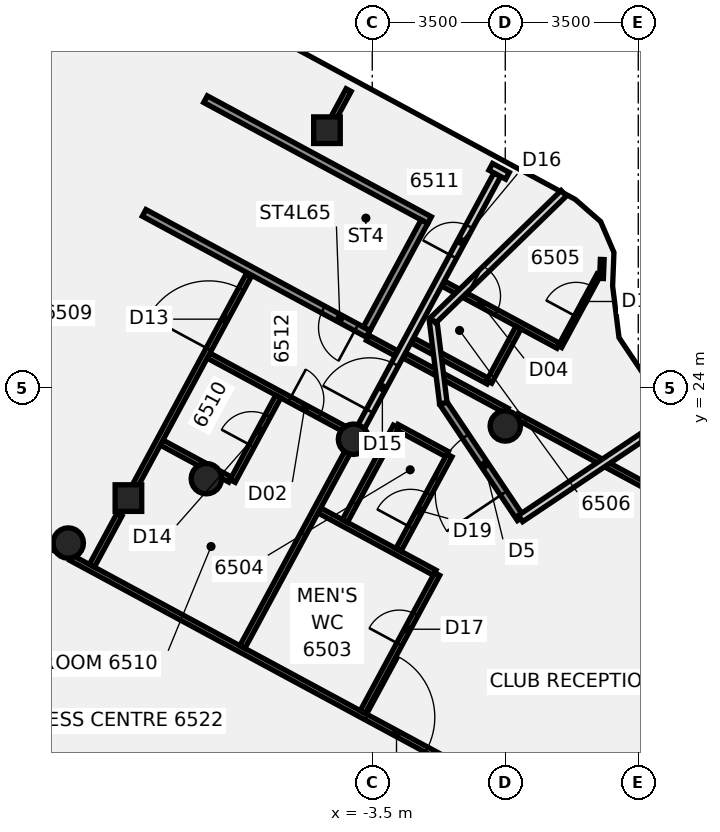
"""IFC4 building model, lengths in metres.
Left out: names, types, materials, properties, quantities, classifications, styles, units other than length and angle.
Written with IfcOpenShell. Run it as: python <this file> out.ifc"""

import sys

from ifc_helpers import new_model, si_unit, direction, frame, frame_2d, origin, origin_2d, place, context, subcontext, project, spatial, polyline, rectangle, circle, outline, extrude, element, fill, save


model = new_model("IFC4")
c1 = context("Model", 3, precision=1e-05, world=origin(), true_north=direction((0.0, 1.0)))
c2 = subcontext(c1, "Body", "Model", "MODEL_VIEW")
j1 = project(units=[si_unit("LENGTHUNIT", "METRE"), si_unit("PLANEANGLEUNIT", "RADIAN")], contexts=[c1])
p1 = place(None, origin())
s1 = spatial("IfcSite", under=j1, at=p1, CompositionType="ELEMENT")
p2 = place(p1, origin())
s2 = spatial("IfcBuilding", under=s1, at=p2, CompositionType="ELEMENT")
p3 = place(p2, frame((0.0, 0.0, 256.8)))
s3 = spatial("IfcBuildingStorey", under=s2, at=p3, CompositionType="ELEMENT", Elevation=256.8)
for number, where, z_axis, x_axis in (
    (1, (0.0, 23.0, -0.14), (0.0, 0.0, 1.0), (1.0, 0.0, 0.0)),
    (2, (-3.994, 22.651, -0.14), (0.0, 0.0, 1.0), (1.0, 0.0, 0.0)),
    (3, (-7.866, 21.613, -0.14), (0.0, 0.0, 1.0), (1.0, 0.0, 0.0)),
    (4, (-11.5, 19.919, -0.14), (0.0, 0.0, 1.0), (1.0, 0.0, 0.0)),
):
    element("IfcColumn", number, at=place(p3, frame(where, z_axis=z_axis, x_axis=x_axis)), inside=s3, PredefinedType="COLUMN", context=c2, shape_type="SweptSolid", body=[
        extrude(circle(Radius=0.4, at=origin_2d()), origin(), (0.0, 0.0, 1.0), 3.6),
    ])
for number, where, z_axis, x_axis in (
    (5, (-9.916, 21.102, -0.136), (0.005, -0.05, 0.999), (0.476, 0.879, 0.042)),
    (6, (-4.692, 30.782, -0.136), (-0.044, -0.024, 0.999), (0.879, -0.475, 0.027)),
):
    element("IfcColumn", number, at=place(p3, frame(where, z_axis=z_axis, x_axis=x_axis)), inside=s3, PredefinedType="COLUMN", context=c2, shape_type="SweptSolid", body=[
        extrude(rectangle(XDim=0.7, YDim=0.7, at=origin_2d()), origin(), (0.0, 0.0, 1.0), 3.6),
    ])
p4 = place(p3, frame((-14.852, 21.379, 0.0), z_axis=(0.0, 0.0, 1.0), x_axis=(0.880026474936, -0.47492462919, 0.0)))
e7 = element("IfcWall", 7, at=p4, inside=s3, PredefinedType="PARTITIONING", context=c2, shape_type="SweptSolid", body=[
    extrude(rectangle(XDim=3.388, YDim=0.1, at=frame_2d((1.694, 0.0))), origin(), (0.0, 0.0, 1.0), 2.864),
])
p5 = place(p3, frame((-11.424, 19.529, 0.0), z_axis=(0.0, 0.0, 1.0), x_axis=(0.880009979756, -0.474955193181, 0.0)))
e8 = element("IfcWall", 8, at=p5, inside=s3, PredefinedType="PARTITIONING", context=c2, shape_type="SweptSolid", body=[
    extrude(rectangle(XDim=15.808, YDim=0.15, at=frame_2d((7.904, 0.0))), origin(), (0.0, 0.0, 1.0), 2.864),
])
p6 = place(p5, frame((8.829, 0.0, 0.0)))
e9 = element("IfcOpeningElement", 9, at=p6, cuts=e8, PredefinedType="OPENING", context=c2, shape_type="SweptSolid", body=[
    extrude(rectangle(XDim=1.8, YDim=2.1, at=frame_2d((0.9, 1.05))), frame((0.0, 0.085, 0.0), z_axis=(0.0, -1.0, 0.0), x_axis=(1.0, 0.0, 0.0)), (0.0, 0.0, 1.0), 0.17),
])
p7 = place(p3, frame((-9.043, 22.562, 0.0), z_axis=(0.0, 0.0, 1.0), x_axis=(0.879935954221, -0.475092324153, 0.0)))
e10 = element("IfcWall", 10, at=p7, inside=s3, PredefinedType="PARTITIONING", context=c2, shape_type="SweptSolid", body=[
    extrude(rectangle(XDim=1.202, YDim=0.15, at=frame_2d((0.601, 0.0))), origin(), (0.0, 0.0, 1.0), 2.864),
])
p8 = place(p3, frame((-7.486, 21.722, 0.0), z_axis=(0.0, 0.0, 1.0), x_axis=(0.880051073949, -0.474879044854, 0.0)))
e11 = element("IfcWall", 11, at=p8, inside=s3, PredefinedType="PARTITIONING", context=c2, shape_type="SweptSolid", body=[
    extrude(rectangle(XDim=0.28, YDim=0.15, at=frame_2d((0.14, 0.0))), origin(), (0.0, 0.0, 1.0), 2.864),
])
p9 = place(p3, frame((-7.808, 24.85, 0.0), z_axis=(0.0, 0.0, 1.0), x_axis=(0.879989576418, -0.474992995101, 0.0)))
e12 = element("IfcWall", 12, at=p9, inside=s3, PredefinedType="PARTITIONING", context=c2, shape_type="SweptSolid", body=[
    extrude(rectangle(XDim=4.025, YDim=0.15, at=frame_2d((2.013, 0.0))), origin(), (0.0, 0.0, 1.0), 2.864),
])
p10 = place(p9, frame((2.425, 0.0, 0.0)))
e13 = element("IfcOpeningElement", 13, at=p10, cuts=e12, PredefinedType="OPENING", context=c2, shape_type="SweptSolid", body=[
    extrude(rectangle(XDim=0.9, YDim=2.1, at=frame_2d((0.45, 1.05))), frame((0.0, 0.085, 0.0), z_axis=(0.0, -1.0, 0.0), x_axis=(1.0, 0.0, 0.0)), (0.0, 0.0, 1.0), 0.17),
])
p11 = place(p3, frame((-4.893, 20.777, 0.0), z_axis=(0.0, 0.0, 1.0), x_axis=(0.880007149788, -0.474960436586, 0.0)))
e14 = element("IfcWall", 14, at=p11, inside=s3, PredefinedType="PARTITIONING", context=c2, shape_type="SweptSolid", body=[
    extrude(rectangle(XDim=3.45, YDim=0.15, at=frame_2d((1.725, 0.0))), origin(), (0.0, 0.0, 1.0), 2.864),
])
p12 = place(p3, frame((-3.619, 25.317, 0.0), z_axis=(0.0, 0.0, 1.0), x_axis=(0.879960000932, -0.475047783659, 0.0)))
e15 = element("IfcWall", 15, at=p12, inside=s3, PredefinedType="PARTITIONING", context=c2, shape_type="SweptSolid", body=[
    extrude(rectangle(XDim=0.86, YDim=0.15, at=frame_2d((0.43, 0.0))), origin(), (0.0, 0.0, 1.0), 2.864),
])
p13 = place(p3, frame((-2.86, 22.976, 0.0), z_axis=(0.0, 0.0, 1.0), x_axis=(0.880085616352, -0.474815024921, 0.0)))
e16 = element("IfcWall", 16, at=p13, inside=s3, PredefinedType="PARTITIONING", context=c2, shape_type="SweptSolid", body=[
    extrude(rectangle(XDim=1.506, YDim=0.15, at=frame_2d((0.753, 0.0))), origin(), (0.0, 0.0, 1.0), 2.864),
])
p14 = place(p3, frame((-2.662, 24.857, 0.0), z_axis=(0.0, 0.0, 1.0), x_axis=(0.880044328611, -0.474891545176, 0.0)))
e17 = element("IfcWall", 17, at=p14, inside=s3, PredefinedType="PARTITIONING", context=c2, shape_type="SweptSolid", body=[
    extrude(rectangle(XDim=3.07, YDim=0.15, at=frame_2d((1.535, 0.0))), origin(), (0.0, 0.0, 1.0), 2.864),
])
p15 = place(p3, frame((0.302, 23.258, 0.0), z_axis=(0.0, 0.0, 1.0), x_axis=(0.88000876601, -0.474957442037, 0.0)))
e18 = element("IfcWall", 18, at=p15, inside=s3, PredefinedType="PARTITIONING", context=c2, shape_type="SweptSolid", body=[
    extrude(rectangle(XDim=14.256, YDim=0.15, at=frame_2d((7.128, 0.0))), origin(), (0.0, 0.0, 1.0), 2.864),
])
p16 = place(p15, frame((4.8, 0.0, 0.0)))
e19 = element("IfcOpeningElement", 19, at=p16, cuts=e18, PredefinedType="OPENING", context=c2, shape_type="SweptSolid", body=[
    extrude(rectangle(XDim=0.9, YDim=2.1, at=frame_2d((0.45, 1.05))), frame((0.0, 0.085, 0.0), z_axis=(0.0, -1.0, 0.0), x_axis=(1.0, 0.0, 0.0)), (0.0, 0.0, 1.0), 0.17),
])
p17 = place(p3, frame((-2.445, 25.251, 0.0), z_axis=(0.0, 0.0, 1.0), x_axis=(0.879950258975, -0.475065828839, 0.0)))
e20 = element("IfcWall", 20, at=p17, inside=s3, PredefinedType="PARTITIONING", context=c2, shape_type="SweptSolid", body=[
    extrude(rectangle(XDim=2.275, YDim=0.15, at=frame_2d((1.138, 0.0))), origin(), (0.0, 0.0, 1.0), 2.864),
])
p18 = place(p3, frame((-1.641, 26.75, 0.0), z_axis=(0.0, 0.0, 1.0), x_axis=(0.879977572417, -0.475015233486, 0.0)))
e21 = element("IfcWall", 21, at=p18, inside=s3, PredefinedType="PARTITIONING", context=c2, shape_type="SweptSolid", body=[
    extrude(rectangle(XDim=3.45, YDim=0.15, at=frame_2d((1.725, 0.0))), origin(), (0.0, 0.0, 1.0), 2.864),
])
p19 = place(p18, frame((0.7, 0.0, 0.0)))
e22 = element("IfcOpeningElement", 22, at=p19, cuts=e21, PredefinedType="OPENING", context=c2, shape_type="SweptSolid", body=[
    extrude(rectangle(XDim=0.9, YDim=2.1, at=frame_2d((0.45, 1.05))), frame((0.0, 0.085, 0.0), z_axis=(0.0, -1.0, 0.0), x_axis=(1.0, 0.0, 0.0)), (0.0, 0.0, 1.0), 0.17),
])
p20 = place(p3, frame((-10.876, 19.324, 0.0), z_axis=(0.0, 0.0, 1.0), x_axis=(0.474948327348, 0.880013685319, 0.0)))
e23 = element("IfcWall", 23, at=p20, inside=s3, PredefinedType="PARTITIONING", context=c2, shape_type="SweptSolid", body=[
    extrude(rectangle(XDim=1.527, YDim=0.15, at=frame_2d((0.763, 0.0))), origin(), (0.0, 0.0, 1.0), 2.864),
])
p21 = place(p3, frame((-9.755, 21.401, 0.0), z_axis=(0.0, 0.0, 1.0), x_axis=(0.47500714936, 0.87998193621, 0.0)))
e24 = element("IfcWall", 24, at=p21, inside=s3, PredefinedType="PARTITIONING", context=c2, shape_type="SweptSolid", body=[
    extrude(rectangle(XDim=6.32, YDim=0.15, at=frame_2d((3.16, 0.0))), origin(), (0.0, 0.0, 1.0), 2.864),
])
p22 = place(p21, frame((4.11, 0.0, 0.0)))
e25 = element("IfcOpeningElement", 25, at=p22, cuts=e24, PredefinedType="OPENING", context=c2, shape_type="SweptSolid", body=[
    extrude(rectangle(XDim=1.8, YDim=2.1, at=frame_2d((0.9, 1.05))), frame((0.0, 0.085, 0.0), z_axis=(0.0, -1.0, 0.0), x_axis=(1.0, 0.0, 0.0)), (0.0, 0.0, 1.0), 0.17),
])
p23 = place(p3, frame((-4.529, 31.083, 0.0), z_axis=(0.0, 0.0, 1.0), x_axis=(0.474932601123, 0.88002217267, 0.0)))
e26 = element("IfcWall", 26, at=p23, inside=s3, PredefinedType="PARTITIONING", context=c2, shape_type="SweptSolid", body=[
    extrude(rectangle(XDim=0.856, YDim=0.15, at=frame_2d((0.428, 0.0))), origin(), (0.0, 0.0, 1.0), 2.864),
])
p24 = place(p3, frame((-7.173, 21.553, 0.0), z_axis=(0.0, 0.0, 1.0), x_axis=(0.475033626328, 0.879967643642, 0.0)))
e27 = element("IfcWall", 27, at=p24, inside=s3, PredefinedType="PARTITIONING", context=c2, shape_type="SweptSolid", body=[
    extrude(rectangle(XDim=2.525, YDim=0.15, at=frame_2d((1.262, 0.0))), origin(), (0.0, 0.0, 1.0), 2.864),
])
p25 = place(p24, frame((1.05, 0.0, 0.0)))
e28 = element("IfcOpeningElement", 28, at=p25, cuts=e27, PredefinedType="OPENING", context=c2, shape_type="SweptSolid", body=[
    extrude(rectangle(XDim=0.9, YDim=2.1, at=frame_2d((0.45, 1.05))), frame((0.0, 0.085, 0.0), z_axis=(0.0, -1.0, 0.0), x_axis=(1.0, 0.0, 0.0)), (0.0, 0.0, 1.0), 0.17),
])
p26 = place(p3, frame((-6.918, 17.183, 0.0), z_axis=(0.0, 0.0, 1.0), x_axis=(0.475010414469, 0.879980173723, 0.0)))
e29 = element("IfcWall", 29, at=p26, inside=s3, PredefinedType="PARTITIONING", context=c2, shape_type="SweptSolid", body=[
    extrude(rectangle(XDim=5.978, YDim=0.15, at=frame_2d((2.989, 0.0))), origin(), (0.0, 0.0, 1.0), 2.864),
])
p27 = place(p3, frame((-3.865, 22.84, 0.0), z_axis=(0.0, 0.0, 1.0), x_axis=(0.474975497938, 0.879999020658, 0.0)))
e30 = element("IfcWall", 30, at=p27, inside=s3, PredefinedType="PARTITIONING", context=c2, shape_type="SweptSolid", body=[
    extrude(rectangle(XDim=7.696, YDim=0.2, at=frame_2d((3.848, 0.0))), origin(), (0.0, 0.0, 1.0), 2.864),
])
p28 = place(p27, frame((0.629, 0.0, 0.0)))
e31 = element("IfcOpeningElement", 31, at=p28, cuts=e30, PredefinedType="OPENING", context=c2, shape_type="SweptSolid", body=[
    extrude(rectangle(XDim=1.4, YDim=2.1, at=frame_2d((0.7, 1.05))), frame((0.0, 0.11, 0.0), z_axis=(0.0, -1.0, 0.0), x_axis=(1.0, 0.0, 0.0)), (0.0, 0.0, 1.0), 0.22),
])
p29 = place(p27, frame((5.247, 0.0, 0.0)))
e32 = element("IfcOpeningElement", 32, at=p29, cuts=e30, PredefinedType="OPENING", context=c2, shape_type="SweptSolid", body=[
    extrude(rectangle(XDim=0.9, YDim=2.1, at=frame_2d((0.45, 1.05))), frame((0.0, 0.11, 0.0), z_axis=(0.0, -1.0, 0.0), x_axis=(1.0, 0.0, 0.0)), (0.0, 0.0, 1.0), 0.22),
])
p30 = place(p3, frame((-4.219, 20.499, 0.0), z_axis=(0.0, 0.0, 1.0), x_axis=(0.47489329303, 0.880043385428, 0.0)))
e33 = element("IfcWall", 33, at=p30, inside=s3, PredefinedType="PARTITIONING", context=c2, shape_type="SweptSolid", body=[
    extrude(rectangle(XDim=2.825, YDim=0.15, at=frame_2d((1.413, 0.0))), origin(), (0.0, 0.0, 1.0), 2.864),
])
p31 = place(p3, frame((-3.75, 15.473, 0.0), z_axis=(0.0, 0.0, 1.0), x_axis=(0.474999530937, 0.879986048531, 0.0)))
e34 = element("IfcWall", 34, at=p31, inside=s3, PredefinedType="PARTITIONING", context=c2, shape_type="SweptSolid", body=[
    extrude(rectangle(XDim=4.125, YDim=0.15, at=frame_2d((2.062, 0.0))), origin(), (0.0, 0.0, 1.0), 2.864),
])
p32 = place(p31, frame((2.025, 0.0, 0.0)))
e35 = element("IfcOpeningElement", 35, at=p32, cuts=e34, PredefinedType="OPENING", context=c2, shape_type="SweptSolid", body=[
    extrude(rectangle(XDim=0.9, YDim=2.1, at=frame_2d((0.45, 1.05))), frame((0.0, 0.085, 0.0), z_axis=(0.0, -1.0, 0.0), x_axis=(1.0, 0.0, 0.0)), (0.0, 0.0, 1.0), 0.17),
])
p33 = place(p3, frame((1.439, 25.087, 0.0), z_axis=(0.0, 0.0, 1.0), x_axis=(0.475008069141, 0.87998143972, 0.0)))
e36 = element("IfcWall", 36, at=p33, inside=s3, PredefinedType="PARTITIONING", context=c2, shape_type="SweptSolid", body=[
    extrude(rectangle(XDim=2.147, YDim=0.1, at=frame_2d((1.074, 0.0))), origin(), (0.0, 0.0, 1.0), 2.864),
])
p34 = place(p33, frame((0.9, 0.0, 0.0)))
e37 = element("IfcOpeningElement", 37, at=p34, cuts=e36, PredefinedType="OPENING", context=c2, shape_type="SweptSolid", body=[
    extrude(rectangle(XDim=0.9, YDim=2.1, at=frame_2d((0.45, 1.05))), frame((0.0, 0.06, 0.0), z_axis=(0.0, -1.0, 0.0), x_axis=(1.0, 0.0, 0.0)), (0.0, 0.0, 1.0), 0.12),
])
p35 = place(p3, frame((-2.811, 19.739, 0.0), z_axis=(0.0, 0.0, 1.0), x_axis=(0.475094053196, 0.879935020679, 0.0)))
e38 = element("IfcWall", 38, at=p35, inside=s3, PredefinedType="PARTITIONING", context=c2, shape_type="SweptSolid", body=[
    extrude(rectangle(XDim=2.825, YDim=0.15, at=frame_2d((1.413, 0.0))), origin(), (0.0, 0.0, 1.0), 2.864),
])
p36 = place(p35, frame((0.675, 0.0, 0.0)))
e39 = element("IfcOpeningElement", 39, at=p36, cuts=e38, PredefinedType="OPENING", context=c2, shape_type="SweptSolid", body=[
    extrude(rectangle(XDim=1.0, YDim=2.1, at=frame_2d((0.5, 1.05))), frame((0.0, 0.085, 0.0), z_axis=(0.0, -1.0, 0.0), x_axis=(1.0, 0.0, 0.0)), (0.0, 0.0, 1.0), 0.17),
])
p37 = place(p3, frame((-0.424, 24.16, 0.0), z_axis=(0.0, 0.0, 1.0), x_axis=(0.475111699271, 0.879925492991, 0.0)))
e40 = element("IfcWall", 40, at=p37, inside=s3, PredefinedType="PARTITIONING", context=c2, shape_type="SweptSolid", body=[
    extrude(rectangle(XDim=1.625, YDim=0.15, at=frame_2d((0.812, 0.0))), origin(), (0.0, 0.0, 1.0), 2.864),
])
p38 = place(p3, frame((2.532, 26.881, 0.0), z_axis=(0.0, 0.0, 1.0), x_axis=(0.039539159627, 0.999218021683, 0.0)))
e41 = element("IfcWall", 41, at=p38, inside=s3, PredefinedType="PARTITIONING", context=c2, shape_type="SweptSolid", body=[
    extrude(rectangle(XDim=0.5, YDim=0.1, at=frame_2d((0.25, 0.0))), origin(), (0.0, 0.0, 1.0), 2.864),
])
p39 = place(p3, frame((0.058, 29.581, 0.0), z_axis=(0.0, 0.0, 1.0), x_axis=(-0.880125838865, 0.474740463583, 0.0)))
e42 = element("IfcWall", 42, at=p39, inside=s3, PredefinedType="PARTITIONING", context=c2, shape_type="SweptSolid", body=[
    extrude(rectangle(XDim=0.5, YDim=0.2, at=frame_2d((0.25, 0.0))), origin(), (0.0, 0.0, 1.0), 2.864),
])
p40 = place(p3, frame((0.403, 20.565, 0.0), z_axis=(0.0, 0.0, 1.0), x_axis=(-0.55638015725, 0.830927867278, 0.0)))
e43 = element("IfcWall", 43, at=p40, inside=s3, PredefinedType="SOLIDWALL", context=c2, shape_type="SweptSolid", body=[
    extrude(rectangle(XDim=3.653, YDim=0.2, at=frame_2d((1.827, 0.0))), origin(), (0.0, 0.0, 1.0), 2.964),
])
p41 = place(p40, frame((0.8, 0.0, 0.0)))
e44 = element("IfcOpeningElement", 44, at=p41, cuts=e43, PredefinedType="OPENING", context=c2, shape_type="SweptSolid", body=[
    extrude(rectangle(XDim=1.8, YDim=2.4, at=frame_2d((0.9, 1.2))), frame((0.0, 0.11, 0.0), z_axis=(0.0, -1.0, 0.0), x_axis=(1.0, 0.0, 0.0)), (0.0, 0.0, 1.0), 0.22),
])
p42 = place(p3, frame((0.403, 20.565, 0.0), z_axis=(0.0, 0.0, 1.0), x_axis=(0.830933103282, 0.556372337441, 0.0)))
e45 = element("IfcWall", 45, at=p42, inside=s3, PredefinedType="SOLIDWALL", context=c2, shape_type="SweptSolid", body=[
    extrude(rectangle(XDim=5.286, YDim=0.2, at=frame_2d((2.643, 0.0))), origin(), (0.0, 0.0, 1.0), 3.46),
])
p43 = place(p3, frame((-1.63, 23.601, 0.0), z_axis=(0.0, 0.0, 1.0), x_axis=(-0.12306236425, 0.99239893919, 0.0)))
e46 = element("IfcWall", 46, at=p43, inside=s3, PredefinedType="SOLIDWALL", context=c2, shape_type="SweptSolid", body=[
    extrude(rectangle(XDim=2.194, YDim=0.2, at=frame_2d((1.097, 0.0))), origin(), (0.0, 0.0, 1.0), 3.46),
])
p44 = place(p3, frame((-1.9, 25.778, 0.0), z_axis=(0.0, 0.0, 1.0), x_axis=(0.716859267363, 0.697217893342, 0.0)))
e47 = element("IfcWall", 47, at=p44, inside=s3, PredefinedType="SOLIDWALL", context=c2, shape_type="SweptSolid", body=[
    extrude(rectangle(XDim=4.798, YDim=0.2, at=frame_2d((2.399, 0.0))), origin(), (0.0, 0.0, 1.0), 3.46),
])
p45 = place(p3, frame((-3.607, 25.424, -0.14), z_axis=(0.0, 0.0, 1.0), x_axis=(-0.879996788685, 0.474979633147, 0.0)))
e48 = element("IfcWall", 48, at=p45, inside=s3, PredefinedType="SHEAR", context=c2, shape_type="SweptSolid", body=[
    extrude(rectangle(XDim=6.7, YDim=0.2, at=frame_2d((3.35, 0.0))), origin(), (0.0, 0.0, 1.0), 3.154),
])
p46 = place(p45, frame((0.35, 0.0, 0.0)))
e49 = element("IfcOpeningElement", 49, at=p46, cuts=e48, PredefinedType="OPENING", context=c2, shape_type="SweptSolid", body=[
    extrude(rectangle(XDim=1.0, YDim=2.1, at=frame_2d((0.5, 1.05))), frame((0.0, 0.11, 0.0), z_axis=(0.0, -1.0, 0.0), x_axis=(1.0, 0.0, 0.0)), (0.0, 0.0, 1.0), 0.22),
])
p47 = place(p3, frame((-1.992, 28.416, -0.14), z_axis=(0.0, 0.0, 1.0), x_axis=(-0.879996788685, 0.474979633147, 0.0)))
e50 = element("IfcWall", 50, at=p47, inside=s3, PredefinedType="SHEAR", context=c2, shape_type="SweptSolid", body=[
    extrude(rectangle(XDim=6.7, YDim=0.2, at=frame_2d((3.35, 0.0))), origin(), (0.0, 0.0, 1.0), 3.154),
])
p48 = place(p3, frame((-2.127, 28.375, -0.14), z_axis=(0.0, 0.0, 1.0), x_axis=(-0.475009504157, -0.879980665106, 0.0)))
e51 = element("IfcWall", 51, at=p48, inside=s3, PredefinedType="SHEAR", context=c2, shape_type="SweptSolid", body=[
    extrude(rectangle(XDim=3.2, YDim=0.2, at=frame_2d((1.6, 0.0))), origin(), (0.0, 0.0, 1.0), 3.6),
])
p49 = place(p3, frame((0.0, 0.0, -0.14)))
e52 = element("IfcWall", 52, at=p49, inside=s3, PredefinedType="SHEAR", context=c2, shape_type="SweptSolid", body=[
    extrude(outline(polyline([(-7.759, 31.415), (-7.935, 31.51), (-9.455, 28.694), (-9.279, 28.599), (-7.759, 31.415)])), origin(), (0.0, 0.0, 1.0), 3.6),
])
p50 = place(p6, origin())
e53 = element("IfcDoor", 53, at=p50, inside=s3, OperationType="DOUBLE_DOOR_SINGLE_SWING", PredefinedType="DOOR", context=c2, shape_type="SweptSolid", body=[
    extrude(rectangle(XDim=1.8, YDim=2.1, at=frame_2d((0.9, 1.05))), frame((0.0, 0.025, 0.0), z_axis=(0.0, -1.0, 0.0), x_axis=(1.0, 0.0, 0.0)), (0.0, 0.0, 1.0), 0.05),
])
fill(e9, e53)
p51 = place(p10, frame((0.9, 0.0, 0.0), z_axis=(0.0, 0.0, 1.0), x_axis=(-1.0, 0.0, 0.0)))
e54 = element("IfcDoor", 54, at=p51, inside=s3, OperationType="SINGLE_SWING_RIGHT", PredefinedType="DOOR", context=c2, shape_type="SweptSolid", body=[
    extrude(rectangle(XDim=0.9, YDim=2.1, at=frame_2d((0.45, 1.05))), frame((0.0, 0.025, 0.0), z_axis=(0.0, -1.0, 0.0), x_axis=(1.0, 0.0, 0.0)), (0.0, 0.0, 1.0), 0.05),
])
fill(e13, e54)
p52 = place(p19, frame((0.9, 0.0, 0.0), z_axis=(0.0, 0.0, 1.0), x_axis=(-1.0, 0.0, 0.0)))
e55 = element("IfcDoor", 55, at=p52, inside=s3, OperationType="SINGLE_SWING_LEFT", PredefinedType="DOOR", context=c2, shape_type="SweptSolid", body=[
    extrude(rectangle(XDim=0.9, YDim=2.1, at=frame_2d((0.45, 1.05))), frame((0.0, 0.025, 0.0), z_axis=(0.0, -1.0, 0.0), x_axis=(1.0, 0.0, 0.0)), (0.0, 0.0, 1.0), 0.05),
])
fill(e22, e55)
p53 = place(p22, origin())
e56 = element("IfcDoor", 56, at=p53, inside=s3, OperationType="DOUBLE_DOOR_SINGLE_SWING", PredefinedType="DOOR", context=c2, shape_type="SweptSolid", body=[
    extrude(rectangle(XDim=1.8, YDim=2.1, at=frame_2d((0.9, 1.05))), frame((0.0, 0.025, 0.0), z_axis=(0.0, -1.0, 0.0), x_axis=(1.0, 0.0, 0.0)), (0.0, 0.0, 1.0), 0.05),
])
fill(e25, e56)
p54 = place(p25, origin())
e57 = element("IfcDoor", 57, at=p54, inside=s3, OperationType="SINGLE_SWING_LEFT", PredefinedType="DOOR", context=c2, shape_type="SweptSolid", body=[
    extrude(rectangle(XDim=0.9, YDim=2.1, at=frame_2d((0.45, 1.05))), frame((0.0, 0.025, 0.0), z_axis=(0.0, -1.0, 0.0), x_axis=(1.0, 0.0, 0.0)), (0.0, 0.0, 1.0), 0.05),
])
fill(e28, e57)
p55 = place(p28, frame((1.4, 0.0, 0.0), z_axis=(0.0, 0.0, 1.0), x_axis=(-1.0, 0.0, 0.0)))
e58 = element("IfcDoor", 58, at=p55, inside=s3, OperationType="DOUBLE_DOOR_SINGLE_SWING", PredefinedType="DOOR", context=c2, shape_type="SweptSolid", body=[
    extrude(rectangle(XDim=1.4, YDim=2.1, at=frame_2d((0.7, 1.05))), frame((0.0, 0.025, 0.0), z_axis=(0.0, -1.0, 0.0), x_axis=(1.0, 0.0, 0.0)), (0.0, 0.0, 1.0), 0.05),
])
fill(e31, e58)
p56 = place(p29, origin())
e59 = element("IfcDoor", 59, at=p56, inside=s3, OperationType="SINGLE_SWING_LEFT", PredefinedType="DOOR", context=c2, shape_type="SweptSolid", body=[
    extrude(rectangle(XDim=0.9, YDim=2.1, at=frame_2d((0.45, 1.05))), frame((0.0, 0.025, 0.0), z_axis=(0.0, -1.0, 0.0), x_axis=(1.0, 0.0, 0.0)), (0.0, 0.0, 1.0), 0.05),
])
fill(e32, e59)
p57 = place(p32, origin())
e60 = element("IfcDoor", 60, at=p57, inside=s3, OperationType="SINGLE_SWING_LEFT", PredefinedType="DOOR", context=c2, shape_type="SweptSolid", body=[
    extrude(rectangle(XDim=0.9, YDim=2.1, at=frame_2d((0.45, 1.05))), frame((0.0, 0.025, 0.0), z_axis=(0.0, -1.0, 0.0), x_axis=(1.0, 0.0, 0.0)), (0.0, 0.0, 1.0), 0.05),
])
fill(e35, e60)
p58 = place(p34, origin())
e61 = element("IfcDoor", 61, at=p58, inside=s3, OperationType="SINGLE_SWING_LEFT", PredefinedType="DOOR", context=c2, shape_type="SweptSolid", body=[
    extrude(rectangle(XDim=0.9, YDim=2.1, at=frame_2d((0.45, 1.05))), frame((0.0, 0.025, 0.0), z_axis=(0.0, -1.0, 0.0), x_axis=(1.0, 0.0, 0.0)), (0.0, 0.0, 1.0), 0.05),
])
fill(e37, e61)
p59 = place(p36, origin())
e62 = element("IfcDoor", 62, at=p59, inside=s3, OperationType="SINGLE_SWING_RIGHT", PredefinedType="DOOR", context=c2, shape_type="SweptSolid", body=[
    extrude(rectangle(XDim=1.0, YDim=2.1, at=frame_2d((0.5, 1.05))), frame((0.0, 0.025, 0.0), z_axis=(0.0, -1.0, 0.0), x_axis=(1.0, 0.0, 0.0)), (0.0, 0.0, 1.0), 0.05),
])
fill(e39, e62)
p60 = place(p41, origin())
e63 = element("IfcDoor", 63, at=p60, inside=s3, OperationType="SINGLE_SWING_LEFT", PredefinedType="DOOR", context=c2, shape_type="SweptSolid", body=[
    extrude(rectangle(XDim=1.8, YDim=2.4, at=frame_2d((0.9, 1.2))), frame((0.0, 0.025, 0.0), z_axis=(0.0, -1.0, 0.0), x_axis=(1.0, 0.0, 0.0)), (0.0, 0.0, 1.0), 0.05),
])
fill(e44, e63)
p61 = place(p46, origin())
e64 = element("IfcDoor", 64, at=p61, inside=s3, OperationType="SINGLE_SWING_LEFT", PredefinedType="DOOR", context=c2, shape_type="SweptSolid", body=[
    extrude(rectangle(XDim=1.0, YDim=2.1, at=frame_2d((0.5, 1.05))), frame((0.0, 0.025, 0.0), z_axis=(0.0, -1.0, 0.0), x_axis=(1.0, 0.0, 0.0)), (0.0, 0.0, 1.0), 0.05),
])
fill(e49, e64)
save(model, sys.argv[1])
